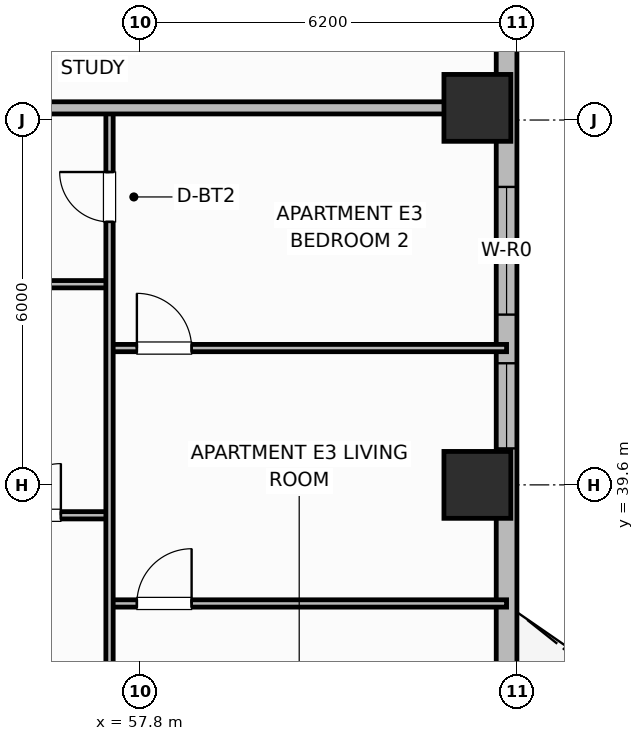
"""IFC4 building model, lengths in metres.
Left out: names, types, materials, properties, quantities, classifications, styles, units other than length and angle.
Written with IfcOpenShell. Run it as: python <this file> out.ifc"""

import sys

from ifc_helpers import new_model, si_unit, direction, frame, frame_2d, origin, origin_2d, place, context, subcontext, project, spatial, rectangle, extrude, element, fill, save


model = new_model("IFC4")
c1 = context("Model", 3, precision=1e-05, world=origin(), true_north=direction((0.0, 1.0)))
c2 = subcontext(c1, "Body", "Model", "MODEL_VIEW")
j1 = project(units=[si_unit("LENGTHUNIT", "METRE"), si_unit("PLANEANGLEUNIT", "RADIAN")], contexts=[c1])
p1 = place(None, origin())
s1 = spatial("IfcSite", under=j1, at=p1, CompositionType="ELEMENT")
p2 = place(p1, origin())
s2 = spatial("IfcBuilding", under=s1, at=p2, CompositionType="ELEMENT")
p3 = place(p2, frame((0.0, 0.0, 92.0)))
s3 = spatial("IfcBuildingStorey", under=s2, at=p3, CompositionType="ELEMENT", Elevation=92.0)
for number, where, z_axis, x_axis in (
    (1, (63.35, 39.6, 0.0), (0.0, 0.0, 1.0), (1.0, 0.0, 0.0)),
    (2, (63.35, 45.8, 0.0), (0.0, 0.0, 1.0), (1.0, 0.0, 0.0)),
):
    element("IfcColumn", number, at=place(p3, frame(where, z_axis=z_axis, x_axis=x_axis)), inside=s3, PredefinedType="COLUMN", context=c2, shape_type="SweptSolid", body=[
        extrude(rectangle(XDim=1.1, YDim=1.1, at=origin_2d()), origin(), (0.0, 0.0, 1.0), 3.7),
    ])
p4 = place(p3, frame((63.83, 32.6, 0.0), z_axis=(0.0, 0.0, 1.0), x_axis=(0.0, 1.0, 0.0)))
e3 = element("IfcWall", 3, at=p4, inside=s3, PredefinedType="SOLIDWALL", context=c2, shape_type="SweptSolid", body=[
    extrude(rectangle(XDim=14.8, YDim=0.34, at=frame_2d((7.4, 0.0))), origin(), (0.0, 0.0, 1.0), 2.7),
])
p5 = place(p4, frame((1.7, 0.0, 0.0)))
e4 = element("IfcOpeningElement", 4, at=p5, cuts=e3, PredefinedType="OPENING", context=c2, shape_type="SweptSolid", body=[
    extrude(rectangle(XDim=1.6, YDim=2.1, at=frame_2d((0.8, 1.05))), frame((0.0, 0.18, 0.0), z_axis=(0.0, -1.0, 0.0), x_axis=(1.0, 0.0, 0.0)), (0.0, 0.0, 1.0), 0.36),
])
p6 = place(p4, frame((7.6, 0.0, 0.69)))
e5 = element("IfcOpeningElement", 5, at=p6, cuts=e3, PredefinedType="OPENING", context=c2, shape_type="SweptSolid", body=[
    extrude(rectangle(XDim=1.4, YDim=1.85, at=frame_2d((0.7, 0.925))), frame((0.0, 0.18, 0.0), z_axis=(0.0, -1.0, 0.0), x_axis=(1.0, 0.0, 0.0)), (0.0, 0.0, 1.0), 0.36),
])
p7 = place(p4, frame((9.8, 0.0, 0.68)))
e6 = element("IfcOpeningElement", 6, at=p7, cuts=e3, PredefinedType="OPENING", context=c2, shape_type="SweptSolid", body=[
    extrude(rectangle(XDim=2.1, YDim=1.9, at=frame_2d((1.05, 0.95))), frame((0.0, 0.18, 0.0), z_axis=(0.0, -1.0, 0.0), x_axis=(1.0, 0.0, 0.0)), (0.0, 0.0, 1.0), 0.36),
])
p8 = place(p3, frame((55.05, 39.1, 0.0), z_axis=(0.0, 0.0, 1.0), x_axis=(1.0, 0.0, 0.0)))
e7 = element("IfcWall", 7, at=p8, inside=s3, PredefinedType="PARTITIONING", context=c2, shape_type="SweptSolid", body=[
    extrude(rectangle(XDim=2.25, YDim=0.12, at=frame_2d((1.125, 0.0))), origin(), (0.0, 0.0, 1.0), 2.53),
])
p9 = place(p8, frame((0.6, 0.0, 0.0)))
e8 = element("IfcOpeningElement", 8, at=p9, cuts=e7, PredefinedType="OPENING", context=c2, shape_type="SweptSolid", body=[
    extrude(rectangle(XDim=0.85, YDim=2.1, at=frame_2d((0.425, 1.05))), frame((0.0, 0.07, 0.0), z_axis=(0.0, -1.0, 0.0), x_axis=(1.0, 0.0, 0.0)), (0.0, 0.0, 1.0), 0.14),
])
p10 = place(p3, frame((55.05, 42.9, 0.0), z_axis=(0.0, 0.0, 1.0), x_axis=(1.0, 0.0, 0.0)))
e9 = element("IfcWall", 9, at=p10, inside=s3, PredefinedType="PARTITIONING", context=c2, shape_type="SweptSolid", body=[
    extrude(rectangle(XDim=2.25, YDim=0.12, at=frame_2d((1.125, 0.0))), origin(), (0.0, 0.0, 1.0), 2.53),
])
p11 = place(p3, frame((57.3, 37.65, 0.0), z_axis=(0.0, 0.0, 1.0), x_axis=(1.0, 0.0, 0.0)))
e10 = element("IfcWall", 10, at=p11, inside=s3, PredefinedType="PARTITIONING", context=c2, shape_type="SweptSolid", body=[
    extrude(rectangle(XDim=6.53, YDim=0.12, at=frame_2d((3.265, 0.0))), origin(), (0.0, 0.0, 1.0), 2.53),
])
p12 = place(p11, frame((0.45, 0.0, 0.0)))
e11 = element("IfcOpeningElement", 11, at=p12, cuts=e10, PredefinedType="OPENING", context=c2, shape_type="SweptSolid", body=[
    extrude(rectangle(XDim=0.9, YDim=2.1, at=frame_2d((0.45, 1.05))), frame((0.0, 0.07, 0.0), z_axis=(0.0, -1.0, 0.0), x_axis=(1.0, 0.0, 0.0)), (0.0, 0.0, 1.0), 0.14),
])
p13 = place(p3, frame((57.3, 41.85, 0.0), z_axis=(0.0, 0.0, 1.0), x_axis=(1.0, 0.0, 0.0)))
e12 = element("IfcWall", 12, at=p13, inside=s3, PredefinedType="PARTITIONING", context=c2, shape_type="SweptSolid", body=[
    extrude(rectangle(XDim=6.53, YDim=0.12, at=frame_2d((3.265, 0.0))), origin(), (0.0, 0.0, 1.0), 2.53),
])
p14 = place(p13, frame((0.45, 0.0, 0.0)))
e13 = element("IfcOpeningElement", 13, at=p14, cuts=e12, PredefinedType="OPENING", context=c2, shape_type="SweptSolid", body=[
    extrude(rectangle(XDim=0.9, YDim=2.1, at=frame_2d((0.45, 1.05))), frame((0.0, 0.07, 0.0), z_axis=(0.0, -1.0, 0.0), x_axis=(1.0, 0.0, 0.0)), (0.0, 0.0, 1.0), 0.14),
])
p15 = place(p3, frame((57.3, 33.74, 0.0), z_axis=(0.0, 0.0, 1.0), x_axis=(0.0, 1.0, 0.0)))
e14 = element("IfcWall", 14, at=p15, inside=s3, PredefinedType="PARTITIONING", context=c2, shape_type="SweptSolid", body=[
    extrude(rectangle(XDim=12.02, YDim=0.12, at=frame_2d((6.01, 0.0))), origin(), (0.0, 0.0, 1.0), 2.53),
])
p16 = place(p15, frame((0.41, 0.0, 0.0)))
e15 = element("IfcOpeningElement", 15, at=p16, cuts=e14, PredefinedType="OPENING", context=c2, shape_type="SweptSolid", body=[
    extrude(rectangle(XDim=0.9, YDim=2.1, at=frame_2d((0.45, 1.05))), frame((0.0, 0.07, 0.0), z_axis=(0.0, -1.0, 0.0), x_axis=(1.0, 0.0, 0.0)), (0.0, 0.0, 1.0), 0.14),
])
p17 = place(p15, frame((10.185, 0.0, 0.0)))
e16 = element("IfcOpeningElement", 16, at=p17, cuts=e14, PredefinedType="OPENING", context=c2, shape_type="SweptSolid", body=[
    extrude(rectangle(XDim=0.82, YDim=2.08, at=frame_2d((0.41, 1.04))), frame((0.0, 0.07, 0.0), z_axis=(0.0, -1.0, 0.0), x_axis=(1.0, 0.0, 0.0)), (0.0, 0.0, 1.0), 0.14),
])
p18 = place(p3, frame((55.05, 45.8, 0.0), z_axis=(0.0, 0.0, 1.0), x_axis=(1.0, 0.0, 0.0)))
e17 = element("IfcWall", 17, at=p18, inside=s3, PredefinedType="PARTITIONING", context=c2, shape_type="SweptSolid", body=[
    extrude(rectangle(XDim=8.36, YDim=0.2, at=frame_2d((4.18, 0.0))), origin(), (0.0, 0.0, 1.0), 2.53),
])
p19 = place(p6, origin())
e18 = element("IfcWindow", 18, at=p19, inside=s3, PartitioningType="SINGLE_PANEL", PredefinedType="WINDOW", context=c2, shape_type="SweptSolid", body=[
    extrude(rectangle(XDim=1.4, YDim=1.85, at=frame_2d((0.7, 0.925))), frame((0.0, 0.03, 0.0), z_axis=(0.0, -1.0, 0.0), x_axis=(1.0, 0.0, 0.0)), (0.0, 0.0, 1.0), 0.06),
])
fill(e5, e18)
p20 = place(p7, origin())
e19 = element("IfcWindow", 19, at=p20, inside=s3, PartitioningType="SINGLE_PANEL", PredefinedType="WINDOW", context=c2, shape_type="SweptSolid", body=[
    extrude(rectangle(XDim=2.1, YDim=1.9, at=frame_2d((1.05, 0.95))), frame((0.0, 0.03, 0.0), z_axis=(0.0, -1.0, 0.0), x_axis=(1.0, 0.0, 0.0)), (0.0, 0.0, 1.0), 0.06),
])
fill(e6, e19)
p21 = place(p9, origin())
e20 = element("IfcDoor", 20, at=p21, inside=s3, OperationType="SINGLE_SWING_RIGHT", PredefinedType="DOOR", context=c2, shape_type="SweptSolid", body=[
    extrude(rectangle(XDim=0.85, YDim=2.1, at=frame_2d((0.425, 1.05))), frame((0.0, 0.025, 0.0), z_axis=(0.0, -1.0, 0.0), x_axis=(1.0, 0.0, 0.0)), (0.0, 0.0, 1.0), 0.05),
])
fill(e8, e20)
p22 = place(p12, origin())
e21 = element("IfcDoor", 21, at=p22, inside=s3, OperationType="SINGLE_SWING_RIGHT", PredefinedType="DOOR", context=c2, shape_type="SweptSolid", body=[
    extrude(rectangle(XDim=0.9, YDim=2.1, at=frame_2d((0.45, 1.05))), frame((0.0, 0.025, 0.0), z_axis=(0.0, -1.0, 0.0), x_axis=(1.0, 0.0, 0.0)), (0.0, 0.0, 1.0), 0.05),
])
fill(e11, e21)
p23 = place(p14, origin())
e22 = element("IfcDoor", 22, at=p23, inside=s3, OperationType="SINGLE_SWING_LEFT", PredefinedType="DOOR", context=c2, shape_type="SweptSolid", body=[
    extrude(rectangle(XDim=0.9, YDim=2.1, at=frame_2d((0.45, 1.05))), frame((0.0, 0.025, 0.0), z_axis=(0.0, -1.0, 0.0), x_axis=(1.0, 0.0, 0.0)), (0.0, 0.0, 1.0), 0.05),
])
fill(e13, e22)
p24 = place(p17, origin())
e23 = element("IfcDoor", 23, at=p24, inside=s3, OperationType="SINGLE_SWING_RIGHT", PredefinedType="DOOR", context=c2, shape_type="SweptSolid", body=[
    extrude(rectangle(XDim=0.82, YDim=2.08, at=frame_2d((0.41, 1.04))), frame((0.0, 0.025, 0.0), z_axis=(0.0, -1.0, 0.0), x_axis=(1.0, 0.0, 0.0)), (0.0, 0.0, 1.0), 0.05),
])
fill(e16, e23)
save(model, sys.argv[1])
